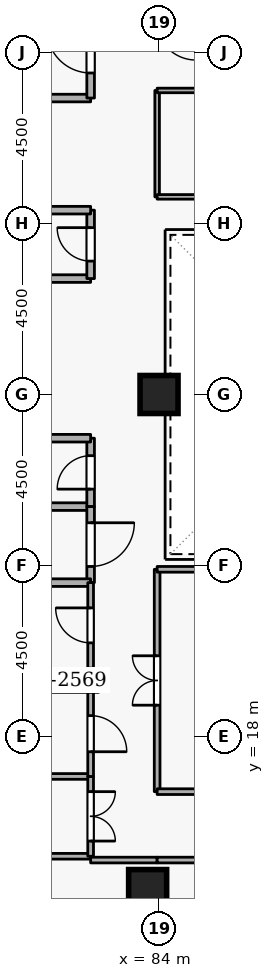
"""IFC4 building model, lengths in metres.
Left out: names, types, materials, properties, quantities, classifications, styles, units other than length and angle.
Written with IfcOpenShell. Run it as: python <this file> out.ifc"""

import sys

from ifc_helpers import new_model, si_unit, direction, frame, frame_2d, origin, origin_2d, place, context, subcontext, project, spatial, rectangle, extrude, element, fill, save


model = new_model("IFC4")
c1 = context("Model", 3, precision=1e-05, world=origin(), true_north=direction((0.0, 1.0)))
c2 = subcontext(c1, "Body", "Model", "MODEL_VIEW")
j1 = project(units=[si_unit("LENGTHUNIT", "METRE"), si_unit("PLANEANGLEUNIT", "RADIAN")], contexts=[c1])
p1 = place(None, origin())
s1 = spatial("IfcSite", under=j1, at=p1, CompositionType="ELEMENT")
p2 = place(p1, origin())
s2 = spatial("IfcBuilding", under=s1, at=p2, CompositionType="ELEMENT")
p3 = place(p2, frame((0.0, 0.0, 214.5)))
s3 = spatial("IfcBuildingStorey", under=s2, at=p3, CompositionType="ELEMENT", Elevation=214.5)
p4 = place(p3, frame((76.6, 19.45, 0.0), z_axis=(0.0, 0.0, 1.0), x_axis=(1.0, 0.0, 0.0)))
e1 = element("IfcWall", 1, at=p4, inside=s3, PredefinedType="SHEAR", context=c2, shape_type="SweptSolid", body=[
    extrude(rectangle(XDim=5.8, YDim=0.5, at=frame_2d((2.9, 0.0))), origin(), (0.0, 0.0, 1.0), 3.6),
])
for number, where, z_axis, x_axis in (
    (2, (83.7, 14.0, 0.0), (0.0, 0.0, 1.0), (1.0, 0.0, 0.0)),
    (3, (84.0, 27.0, 0.0), (0.0, 0.0, 1.0), (1.0, 0.0, 0.0)),
):
    element("IfcColumn", number, at=place(p3, frame(where, z_axis=z_axis, x_axis=x_axis)), inside=s3, PredefinedType="COLUMN", context=c2, shape_type="SweptSolid", body=[
        extrude(rectangle(XDim=1.0, YDim=1.0, at=origin_2d()), origin(), (0.0, 0.0, 1.0), 3.6),
    ])
p5 = place(p3, frame((79.9, 34.8, 0.0), z_axis=(0.0, 0.0, 1.0), x_axis=(1.0, 0.0, 0.0)))
e4 = element("IfcWall", 4, at=p5, inside=s3, PredefinedType="STANDARD", context=c2, shape_type="SweptSolid", body=[
    extrude(rectangle(XDim=2.3, YDim=0.2, at=frame_2d((1.15, 0.0))), origin(), (0.0, 0.0, 1.0), 2.545),
])
p6 = place(p3, frame((82.2, 34.8, 0.0), z_axis=(0.0, 0.0, 1.0), x_axis=(0.0, 1.0, 0.0)))
e5 = element("IfcWall", 5, at=p6, inside=s3, PredefinedType="STANDARD", context=c2, shape_type="SweptSolid", body=[
    extrude(rectangle(XDim=2.5, YDim=0.2, at=frame_2d((1.25, 0.0))), origin(), (0.0, 0.0, 1.0), 3.34),
])
p7 = place(p6, frame((0.66, 0.0, 0.0)))
e6 = element("IfcOpeningElement", 6, at=p7, cuts=e5, PredefinedType="OPENING", context=c2, shape_type="SweptSolid", body=[
    extrude(rectangle(XDim=1.15, YDim=2.1, at=frame_2d((0.575, 1.05))), frame((0.0, 0.11, 0.0), z_axis=(0.0, -1.0, 0.0), x_axis=(1.0, 0.0, 0.0)), (0.0, 0.0, 1.0), 0.22),
])
p8 = place(p3, frame((80.15, 24.05, 0.0), z_axis=(0.0, 0.0, 1.0), x_axis=(1.0, 0.0, 0.0)))
e7 = element("IfcWall", 7, at=p8, inside=s3, PredefinedType="STANDARD", context=c2, shape_type="SweptSolid", body=[
    extrude(rectangle(XDim=2.05, YDim=0.2, at=frame_2d((1.025, 0.0))), origin(), (0.0, 0.0, 1.0), 3.34),
])
p9 = place(p3, frame((82.2, 24.05, 0.0), z_axis=(0.0, 0.0, 1.0), x_axis=(0.0, 1.0, 0.0)))
e8 = element("IfcWall", 8, at=p9, inside=s3, PredefinedType="STANDARD", context=c2, shape_type="SweptSolid", body=[
    extrude(rectangle(XDim=1.8, YDim=0.2, at=frame_2d((0.9, 0.0))), origin(), (0.0, 0.0, 1.0), 3.34),
])
p10 = place(p9, frame((0.46, 0.0, 0.0)))
e9 = element("IfcOpeningElement", 9, at=p10, cuts=e8, PredefinedType="OPENING", context=c2, shape_type="SweptSolid", body=[
    extrude(rectangle(XDim=0.88, YDim=2.04, at=frame_2d((0.44, 1.02))), frame((0.0, 0.11, 0.0), z_axis=(0.0, -1.0, 0.0), x_axis=(1.0, 0.0, 0.0)), (0.0, 0.0, 1.0), 0.22),
])
for number, where, z_axis, x_axis in (
    (10, (82.2, 25.85, 0.0), (0.0, 0.0, 1.0), (-1.0, 0.0, 0.0)),
    (11, (80.15, 30.05, 0.0), (0.0, 0.0, 1.0), (1.0, 0.0, 0.0)),
):
    element("IfcWall", number, at=place(p3, frame(where, z_axis=z_axis, x_axis=x_axis)), inside=s3, PredefinedType="STANDARD", context=c2, shape_type="SweptSolid", body=[
        extrude(rectangle(XDim=2.05, YDim=0.2, at=frame_2d((1.025, 0.0))), origin(), (0.0, 0.0, 1.0), 3.34),
    ])
p11 = place(p3, frame((82.2, 30.05, 0.0), z_axis=(0.0, 0.0, 1.0), x_axis=(0.0, 1.0, 0.0)))
e12 = element("IfcWall", 12, at=p11, inside=s3, PredefinedType="STANDARD", context=c2, shape_type="SweptSolid", body=[
    extrude(rectangle(XDim=1.8, YDim=0.2, at=frame_2d((0.9, 0.0))), origin(), (0.0, 0.0, 1.0), 3.34),
])
p12 = place(p11, frame((0.46, 0.0, 0.0)))
e13 = element("IfcOpeningElement", 13, at=p12, cuts=e12, PredefinedType="OPENING", context=c2, shape_type="SweptSolid", body=[
    extrude(rectangle(XDim=0.88, YDim=2.04, at=frame_2d((0.44, 1.02))), frame((0.0, 0.11, 0.0), z_axis=(0.0, -1.0, 0.0), x_axis=(1.0, 0.0, 0.0)), (0.0, 0.0, 1.0), 0.22),
])
p13 = place(p3, frame((82.2, 31.85, 0.0), z_axis=(0.0, 0.0, 1.0), x_axis=(-1.0, 0.0, 0.0)))
e14 = element("IfcWall", 14, at=p13, inside=s3, PredefinedType="STANDARD", context=c2, shape_type="SweptSolid", body=[
    extrude(rectangle(XDim=2.05, YDim=0.2, at=frame_2d((1.025, 0.0))), origin(), (0.0, 0.0, 1.0), 3.34),
])
p14 = place(p3, frame((82.2, 24.05, 0.0), z_axis=(0.0, 0.0, 1.0), x_axis=(0.0, -1.0, 0.0)))
e15 = element("IfcWall", 15, at=p14, inside=s3, PredefinedType="STANDARD", context=c2, shape_type="SweptSolid", body=[
    extrude(rectangle(XDim=2.0, YDim=0.2, at=frame_2d((1.0, 0.0))), origin(), (0.0, 0.0, 1.0), 3.34),
])
p15 = place(p14, frame((0.425, 0.0, 0.0)))
e16 = element("IfcOpeningElement", 16, at=p15, cuts=e15, PredefinedType="OPENING", context=c2, shape_type="SweptSolid", body=[
    extrude(rectangle(XDim=1.15, YDim=2.1, at=frame_2d((0.575, 1.05))), frame((0.0, 0.11, 0.0), z_axis=(0.0, -1.0, 0.0), x_axis=(1.0, 0.0, 0.0)), (0.0, 0.0, 1.0), 0.22),
])
p16 = place(p3, frame((82.2, 22.05, 0.0), z_axis=(0.0, 0.0, 1.0), x_axis=(-1.0, 0.0, 0.0)))
e17 = element("IfcWall", 17, at=p16, inside=s3, PredefinedType="STANDARD", context=c2, shape_type="SweptSolid", body=[
    extrude(rectangle(XDim=2.05, YDim=0.2, at=frame_2d((1.025, 0.0))), origin(), (0.0, 0.0, 1.0), 3.34),
])
p17 = place(p3, frame((82.2, 19.8, 0.0), z_axis=(0.0, 0.0, 1.0), x_axis=(0.0, 1.0, 0.0)))
e18 = element("IfcWall", 18, at=p17, inside=s3, PredefinedType="PARTITIONING", context=c2, shape_type="SweptSolid", body=[
    extrude(rectangle(XDim=2.25, YDim=0.15, at=frame_2d((1.125, 0.0))), origin(), (0.0, 0.0, 1.0), 3.34),
])
p18 = place(p17, frame((0.665, 0.0, 0.0)))
e19 = element("IfcOpeningElement", 19, at=p18, cuts=e18, PredefinedType="OPENING", context=c2, shape_type="SweptSolid", body=[
    extrude(rectangle(XDim=0.92, YDim=2.08, at=frame_2d((0.46, 1.04))), frame((0.0, 0.085, 0.0), z_axis=(0.0, -1.0, 0.0), x_axis=(1.0, 0.0, 0.0)), (0.0, 0.0, 1.0), 0.17),
])
for number, where, z_axis, x_axis in (
    (20, (82.2, 14.85, 0.0), (0.0, 0.0, 1.0), (-1.0, 0.0, 0.0)),
    (21, (64.78, 16.95, 0.0), (0.0, 0.0, 1.0), (1.0, 0.0, 0.0)),
):
    element("IfcWall", number, at=place(p3, frame(where, z_axis=z_axis, x_axis=x_axis)), inside=s3, PredefinedType="PARTITIONING", context=c2, shape_type="SweptSolid", body=[
        extrude(rectangle(XDim=17.42, YDim=0.15, at=frame_2d((8.71, 0.0))), origin(), (0.0, 0.0, 1.0), 3.34),
    ])
p19 = place(p3, frame((82.2, 16.95, 0.0), z_axis=(0.0, 0.0, 1.0), x_axis=(0.0, -1.0, 0.0)))
e22 = element("IfcWall", 22, at=p19, inside=s3, PredefinedType="PARTITIONING", context=c2, shape_type="SweptSolid", body=[
    extrude(rectangle(XDim=2.1, YDim=0.15, at=frame_2d((1.05, 0.0))), origin(), (0.0, 0.0, 1.0), 3.34),
])
p20 = place(p19, frame((0.4, 0.0, 0.0)))
e23 = element("IfcOpeningElement", 23, at=p20, cuts=e22, PredefinedType="OPENING", context=c2, shape_type="SweptSolid", body=[
    extrude(rectangle(XDim=1.3, YDim=2.12, at=frame_2d((0.65, 1.06))), frame((0.0, 0.085, 0.0), z_axis=(0.0, -1.0, 0.0), x_axis=(1.0, 0.0, 0.0)), (0.0, 0.0, 1.0), 0.17),
])
p21 = place(p3, frame((82.2, 19.2, 0.0), z_axis=(0.0, 0.0, 1.0), x_axis=(0.0, -1.0, 0.0)))
e24 = element("IfcWall", 24, at=p21, inside=s3, PredefinedType="PARTITIONING", context=c2, shape_type="SweptSolid", body=[
    extrude(rectangle(XDim=2.25, YDim=0.15, at=frame_2d((1.125, 0.0))), origin(), (0.0, 0.0, 1.0), 3.34),
])
p22 = place(p21, frame((0.65, 0.0, 0.0)))
e25 = element("IfcOpeningElement", 25, at=p22, cuts=e24, PredefinedType="OPENING", context=c2, shape_type="SweptSolid", body=[
    extrude(rectangle(XDim=0.95, YDim=2.1, at=frame_2d((0.475, 1.05))), frame((0.0, 0.085, 0.0), z_axis=(0.0, -1.0, 0.0), x_axis=(1.0, 0.0, 0.0)), (0.0, 0.0, 1.0), 0.17),
])
p23 = place(p3, frame((82.2, 14.75, 0.0), z_axis=(0.0, 0.0, 1.0), x_axis=(1.0, 0.0, 0.0)))
e26 = element("IfcWall", 26, at=p23, inside=s3, PredefinedType="PARTITIONING", context=c2, shape_type="SweptSolid", body=[
    extrude(rectangle(XDim=1.75, YDim=0.15, at=frame_2d((0.875, 0.0))), origin(), (0.0, 0.0, 1.0), 3.34),
])
p24 = place(p3, frame((83.95, 14.75, 0.0), z_axis=(0.0, 0.0, 1.0), x_axis=(1.0, 0.0, 0.0)))
e27 = element("IfcWall", 27, at=p24, inside=s3, PredefinedType="PARTITIONING", context=c2, shape_type="SweptSolid", body=[
    extrude(rectangle(XDim=3.35, YDim=0.15, at=frame_2d((1.675, 0.0))), origin(), (0.0, 0.0, 1.0), 3.34),
])
p25 = place(p24, frame((1.025, 0.0, 0.0)))
e28 = element("IfcOpeningElement", 28, at=p25, cuts=e27, PredefinedType="OPENING", context=c2, shape_type="SweptSolid", body=[
    extrude(rectangle(XDim=1.3, YDim=2.12, at=frame_2d((0.65, 1.06))), frame((0.0, 0.085, 0.0), z_axis=(0.0, -1.0, 0.0), x_axis=(1.0, 0.0, 0.0)), (0.0, 0.0, 1.0), 0.17),
])
p26 = place(p3, frame((83.95, 16.55, 0.0), z_axis=(0.0, 0.0, 1.0), x_axis=(0.0, 1.0, 0.0)))
e29 = element("IfcWall", 29, at=p26, inside=s3, PredefinedType="PARTITIONING", context=c2, shape_type="SweptSolid", body=[
    extrude(rectangle(XDim=5.85, YDim=0.15, at=frame_2d((2.925, 0.0))), origin(), (0.0, 0.0, 1.0), 3.34),
])
p27 = place(p26, frame((2.275, 0.0, 0.0)))
e30 = element("IfcOpeningElement", 30, at=p27, cuts=e29, PredefinedType="OPENING", context=c2, shape_type="SweptSolid", body=[
    extrude(rectangle(XDim=1.3, YDim=2.12, at=frame_2d((0.65, 1.06))), frame((0.0, 0.085, 0.0), z_axis=(0.0, -1.0, 0.0), x_axis=(1.0, 0.0, 0.0)), (0.0, 0.0, 1.0), 0.17),
])
for number, where, z_axis, x_axis in (
    (31, (83.95, 22.4, 0.0), (0.0, 0.0, 1.0), (1.0, 0.0, 0.0)),
    (32, (87.3, 16.55, 0.0), (0.0, 0.0, 1.0), (-1.0, 0.0, 0.0)),
):
    element("IfcWall", number, at=place(p3, frame(where, z_axis=z_axis, x_axis=x_axis)), inside=s3, PredefinedType="PARTITIONING", context=c2, shape_type="SweptSolid", body=[
        extrude(rectangle(XDim=3.35, YDim=0.15, at=frame_2d((1.675, 0.0))), origin(), (0.0, 0.0, 1.0), 3.34),
    ])
p28 = place(p3, frame((83.95, 32.2, 0.0), z_axis=(0.0, 0.0, 1.0), x_axis=(0.0, 1.0, 0.0)))
e33 = element("IfcWall", 33, at=p28, inside=s3, PredefinedType="PARTITIONING", context=c2, shape_type="SweptSolid", body=[
    extrude(rectangle(XDim=2.8, YDim=0.12, at=frame_2d((1.4, 0.0))), origin(), (0.0, 0.0, 1.0), 3.34),
])
p29 = place(p3, frame((83.95, 35.0, 0.0), z_axis=(0.0, 0.0, 1.0), x_axis=(1.0, 0.0, 0.0)))
e34 = element("IfcWall", 34, at=p29, inside=s3, PredefinedType="PARTITIONING", context=c2, shape_type="SweptSolid", body=[
    extrude(rectangle(XDim=4.55, YDim=0.12, at=frame_2d((2.275, 0.0))), origin(), (0.0, 0.0, 1.0), 3.34),
])
p30 = place(p29, frame((1.8, 0.0, 0.0)))
e35 = element("IfcOpeningElement", 35, at=p30, cuts=e34, PredefinedType="OPENING", context=c2, shape_type="SweptSolid", body=[
    extrude(rectangle(XDim=0.95, YDim=2.1, at=frame_2d((0.475, 1.05))), frame((0.0, 0.07, 0.0), z_axis=(0.0, -1.0, 0.0), x_axis=(1.0, 0.0, 0.0)), (0.0, 0.0, 1.0), 0.14),
])
p31 = place(p3, frame((88.5, 32.2, 0.0), z_axis=(0.0, 0.0, 1.0), x_axis=(-1.0, 0.0, 0.0)))
e36 = element("IfcWall", 36, at=p31, inside=s3, PredefinedType="PARTITIONING", context=c2, shape_type="SweptSolid", body=[
    extrude(rectangle(XDim=4.55, YDim=0.12, at=frame_2d((2.275, 0.0))), origin(), (0.0, 0.0, 1.0), 3.34),
])
p32 = place(p7, origin())
e37 = element("IfcDoor", 37, at=p32, inside=s3, OperationType="SINGLE_SWING_RIGHT", PredefinedType="DOOR", context=c2, shape_type="SweptSolid", body=[
    extrude(rectangle(XDim=1.15, YDim=2.1, at=frame_2d((0.575, 1.05))), frame((0.0, 0.025, 0.0), z_axis=(0.0, -1.0, 0.0), x_axis=(1.0, 0.0, 0.0)), (0.0, 0.0, 1.0), 0.05),
])
fill(e6, e37)
p33 = place(p10, origin())
e38 = element("IfcDoor", 38, at=p33, inside=s3, OperationType="SINGLE_SWING_LEFT", PredefinedType="DOOR", context=c2, shape_type="SweptSolid", body=[
    extrude(rectangle(XDim=0.88, YDim=2.04, at=frame_2d((0.44, 1.02))), frame((0.0, 0.025, 0.0), z_axis=(0.0, -1.0, 0.0), x_axis=(1.0, 0.0, 0.0)), (0.0, 0.0, 1.0), 0.05),
])
fill(e9, e38)
p34 = place(p12, origin())
e39 = element("IfcDoor", 39, at=p34, inside=s3, OperationType="SINGLE_SWING_RIGHT", PredefinedType="DOOR", context=c2, shape_type="SweptSolid", body=[
    extrude(rectangle(XDim=0.88, YDim=2.04, at=frame_2d((0.44, 1.02))), frame((0.0, 0.025, 0.0), z_axis=(0.0, -1.0, 0.0), x_axis=(1.0, 0.0, 0.0)), (0.0, 0.0, 1.0), 0.05),
])
fill(e13, e39)
p35 = place(p18, origin())
e40 = element("IfcDoor", 40, at=p35, inside=s3, OperationType="SINGLE_SWING_RIGHT", PredefinedType="DOOR", context=c2, shape_type="SweptSolid", body=[
    extrude(rectangle(XDim=0.92, YDim=2.08, at=frame_2d((0.46, 1.04))), frame((0.0, 0.025, 0.0), z_axis=(0.0, -1.0, 0.0), x_axis=(1.0, 0.0, 0.0)), (0.0, 0.0, 1.0), 0.05),
])
fill(e19, e40)
p36 = place(p15, origin())
e41 = element("IfcDoor", 41, at=p36, inside=s3, OperationType="SINGLE_SWING_LEFT", PredefinedType="DOOR", context=c2, shape_type="SweptSolid", body=[
    extrude(rectangle(XDim=1.15, YDim=2.1, at=frame_2d((0.575, 1.05))), frame((0.0, 0.025, 0.0), z_axis=(0.0, -1.0, 0.0), x_axis=(1.0, 0.0, 0.0)), (0.0, 0.0, 1.0), 0.05),
])
fill(e16, e41)
p37 = place(p20, origin())
e42 = element("IfcDoor", 42, at=p37, inside=s3, OperationType="DOUBLE_DOOR_SINGLE_SWING", PredefinedType="DOOR", context=c2, shape_type="SweptSolid", body=[
    extrude(rectangle(XDim=1.3, YDim=2.12, at=frame_2d((0.65, 1.06))), frame((0.0, 0.025, 0.0), z_axis=(0.0, -1.0, 0.0), x_axis=(1.0, 0.0, 0.0)), (0.0, 0.0, 1.0), 0.05),
])
fill(e23, e42)
p38 = place(p22, origin())
e43 = element("IfcDoor", 43, at=p38, inside=s3, OperationType="SINGLE_SWING_RIGHT", PredefinedType="DOOR", context=c2, shape_type="SweptSolid", body=[
    extrude(rectangle(XDim=0.95, YDim=2.1, at=frame_2d((0.475, 1.05))), frame((0.0, 0.025, 0.0), z_axis=(0.0, -1.0, 0.0), x_axis=(1.0, 0.0, 0.0)), (0.0, 0.0, 1.0), 0.05),
])
fill(e25, e43)
p39 = place(p27, origin())
e44 = element("IfcDoor", 44, at=p39, inside=s3, OperationType="DOUBLE_DOOR_SINGLE_SWING", PredefinedType="DOOR", context=c2, shape_type="SweptSolid", body=[
    extrude(rectangle(XDim=1.3, YDim=2.12, at=frame_2d((0.65, 1.06))), frame((0.0, 0.025, 0.0), z_axis=(0.0, -1.0, 0.0), x_axis=(1.0, 0.0, 0.0)), (0.0, 0.0, 1.0), 0.05),
])
fill(e30, e44)
save(model, sys.argv[1])
